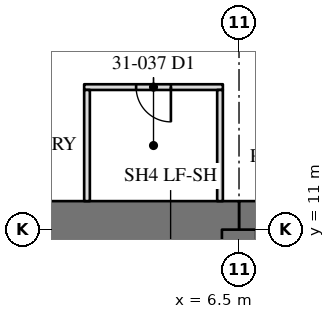
"""IFC4 building model, lengths in metres.
Left out: names, types, materials, properties, quantities, classifications, styles, units other than length and angle.
Written with IfcOpenShell. Run it as: python <this file> out.ifc"""

import sys

from ifc_helpers import new_model, si_unit, direction, frame, frame_2d, origin, place, context, subcontext, project, spatial, rectangle, extrude, element, fill, save


model = new_model("IFC4")
c1 = context("Model", 3, precision=1e-05, world=origin(), true_north=direction((0.0, 1.0)))
c2 = subcontext(c1, "Body", "Model", "MODEL_VIEW")
j1 = project(units=[si_unit("LENGTHUNIT", "METRE"), si_unit("PLANEANGLEUNIT", "RADIAN")], contexts=[c1])
p1 = place(None, origin())
s1 = spatial("IfcSite", under=j1, at=p1, CompositionType="ELEMENT")
p2 = place(p1, origin())
s2 = spatial("IfcBuilding", under=s1, at=p2, CompositionType="ELEMENT")
p3 = place(p2, frame((0.0, 0.0, 133.6)))
s3 = spatial("IfcBuildingStorey", under=s2, at=p3, CompositionType="ELEMENT", Elevation=133.6)
p4 = place(p3, frame((11.0, 11.0, 0.0), z_axis=(0.0, 0.0, 1.0), x_axis=(-1.0, 0.0, 0.0)))
e1 = element("IfcWall", 1, at=p4, inside=s3, PredefinedType="SHEAR", context=c2, shape_type="SweptSolid", body=[
    extrude(rectangle(XDim=4.5, YDim=1.5, at=frame_2d((2.25, 0.0))), origin(), (0.0, 0.0, 1.0), 4.1),
])
p5 = place(p3, frame((6.5, 11.0, 0.0), z_axis=(0.0, 0.0, 1.0), x_axis=(-1.0, 0.0, 0.0)))
e2 = element("IfcWall", 2, at=p5, inside=s3, PredefinedType="SHEAR", context=c2, shape_type="SweptSolid", body=[
    extrude(rectangle(XDim=13.0, YDim=1.5, at=frame_2d((6.5, 0.0))), origin(), (0.0, 0.0, 1.0), 4.1),
])
p6 = place(p3, frame((6.5, 6.5, 0.0), z_axis=(0.0, 0.0, 1.0), x_axis=(0.0, 1.0, 0.0)))
e3 = element("IfcWall", 3, at=p6, inside=s3, PredefinedType="SHEAR", context=c2, shape_type="SweptSolid", body=[
    extrude(rectangle(XDim=4.5, YDim=0.9, at=frame_2d((2.25, 0.0))), origin(), (0.0, 0.0, 1.0), 4.1),
])
p7 = place(p3, frame((6.075, 14.75, 0.0), z_axis=(0.0, 0.0, 1.0), x_axis=(-1.0, 0.0, 0.0)))
e4 = element("IfcWall", 4, at=p7, inside=s3, PredefinedType="PARTITIONING", context=c2, shape_type="SweptSolid", body=[
    extrude(rectangle(XDim=3.65, YDim=0.15, at=frame_2d((1.825, 0.0))), origin(), (0.0, 0.0, 1.0), 3.91),
])
p8 = place(p7, frame((1.367, 0.0, 0.0)))
e5 = element("IfcOpeningElement", 5, at=p8, cuts=e4, PredefinedType="OPENING", context=c2, shape_type="SweptSolid", body=[
    extrude(rectangle(XDim=0.915, YDim=2.134, at=frame_2d((0.458, 1.067))), frame((0.0, 0.085, 0.0), z_axis=(0.0, -1.0, 0.0), x_axis=(1.0, 0.0, 0.0)), (0.0, 0.0, 1.0), 0.17),
])
for number, where, z_axis, x_axis in (
    (6, (6.0, 14.675, 0.0), (0.0, 0.0, 1.0), (0.0, -1.0, 0.0)),
    (7, (2.5, 14.675, 0.0), (0.0, 0.0, 1.0), (0.0, -1.0, 0.0)),
):
    element("IfcWall", number, at=place(p3, frame(where, z_axis=z_axis, x_axis=x_axis)), inside=s3, PredefinedType="PARTITIONING", context=c2, shape_type="SweptSolid", body=[
        extrude(rectangle(XDim=2.925, YDim=0.15, at=frame_2d((1.462, 0.0))), origin(), (0.0, 0.0, 1.0), 3.91),
    ])
p9 = place(p8, origin())
e8 = element("IfcDoor", 8, at=p9, inside=s3, OperationType="SINGLE_SWING_LEFT", PredefinedType="DOOR", context=c2, shape_type="SweptSolid", body=[
    extrude(rectangle(XDim=0.915, YDim=2.134, at=frame_2d((0.458, 1.067))), frame((0.0, 0.025, 0.0), z_axis=(0.0, -1.0, 0.0), x_axis=(1.0, 0.0, 0.0)), (0.0, 0.0, 1.0), 0.05),
])
fill(e5, e8)
save(model, sys.argv[1])
